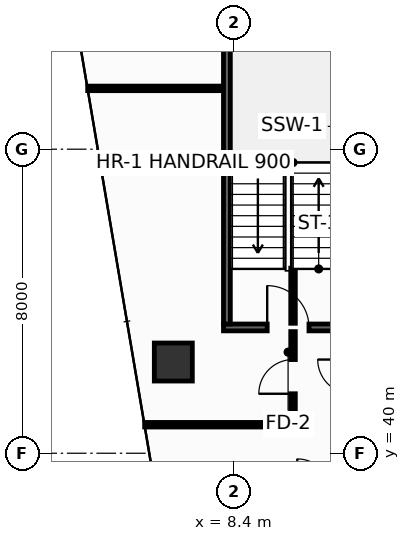
"""IFC4 building model, lengths in metres.
Left out: names, types, materials, properties, quantities, classifications, styles, units other than length and angle.
Written with IfcOpenShell. Run it as: python <this file> out.ifc"""

import sys

from ifc_helpers import new_model, si_unit, direction, frame, frame_2d, origin, origin_2d, place, context, subcontext, project, spatial, rectangle, hollow_rectangle, extrude, element, fill, save


model = new_model("IFC4")
c1 = context("Model", 3, precision=1e-05, world=origin(), true_north=direction((0.0, 1.0)))
c2 = subcontext(c1, "Body", "Model", "MODEL_VIEW")
j1 = project(units=[si_unit("LENGTHUNIT", "METRE"), si_unit("PLANEANGLEUNIT", "RADIAN")], contexts=[c1])
p1 = place(None, origin())
s1 = spatial("IfcSite", under=j1, at=p1, CompositionType="ELEMENT")
p2 = place(p1, origin())
s2 = spatial("IfcBuilding", under=s1, at=p2, CompositionType="ELEMENT")
p3 = place(p2, frame((0.0, 0.0, 175.2)))
s3 = spatial("IfcBuildingStorey", under=s2, at=p3, CompositionType="ELEMENT", Elevation=175.2)
p4 = place(p3, frame((6.8, 42.4, 0.0), z_axis=(0.0, 0.0, 1.0), x_axis=(1.0, 0.0, 0.0)))
e1 = element("IfcColumn", 1, at=p4, inside=s3, PredefinedType="COLUMN", context=c2, shape_type="SweptSolid", body=[
    extrude(hollow_rectangle(XDim=1.0, YDim=1.0, WallThickness=0.045, at=origin_2d()), origin(), (0.0, 0.0, 1.0), 3.8),
])
p5 = place(p3, frame((8.12, 43.31, 0.0), z_axis=(0.0, 0.0, 1.0), x_axis=(1.0, 0.0, 0.0)))
e2 = element("IfcWall", 2, at=p5, inside=s3, PredefinedType="SHEAR", context=c2, shape_type="SweptSolid", body=[
    extrude(rectangle(XDim=3.41, YDim=0.18, at=frame_2d((1.705, 0.0))), origin(), (0.0, 0.0, 1.0), 3.55),
])
p6 = place(p5, frame((1.15, 0.0, 0.0)))
e3 = element("IfcOpeningElement", 3, at=p6, cuts=e2, PredefinedType="OPENING", context=c2, shape_type="SweptSolid", body=[
    extrude(rectangle(XDim=1.1, YDim=2.15, at=frame_2d((0.55, 1.075))), frame((0.0, 0.1, 0.0), z_axis=(0.0, -1.0, 0.0), x_axis=(1.0, 0.0, 0.0)), (0.0, 0.0, 1.0), 0.2),
])
p7 = place(p3, frame((8.21, 53.8, 0.0), z_axis=(0.0, 0.0, 1.0), x_axis=(0.0, -1.0, 0.0)))
e4 = element("IfcWall", 4, at=p7, inside=s3, PredefinedType="SHEAR", context=c2, shape_type="SweptSolid", body=[
    extrude(rectangle(XDim=10.4, YDim=0.18, at=frame_2d((5.2, 0.0))), origin(), (0.0, 0.0, 1.0), 3.55),
])
p8 = place(p3, frame((6.045, 40.75, 0.0), z_axis=(0.0, 0.0, 1.0), x_axis=(1.0, 0.0, 0.0)))
e5 = element("IfcWall", 5, at=p8, inside=s3, PredefinedType="PARTITIONING", context=c2, shape_type="SweptSolid", body=[
    extrude(rectangle(XDim=3.905, YDim=0.12, at=frame_2d((1.952, 0.0))), origin(), (0.0, 0.0, 1.0), 3.035),
])
p9 = place(p3, frame((4.547, 49.6, 0.0), z_axis=(0.0, 0.0, 1.0), x_axis=(1.0, 0.0, 0.0)))
e6 = element("IfcWall", 6, at=p9, inside=s3, PredefinedType="PARTITIONING", context=c2, shape_type="SweptSolid", body=[
    extrude(rectangle(XDim=3.553, YDim=0.12, at=frame_2d((1.777, 0.0))), origin(), (0.0, 0.0, 1.0), 2.835),
])
p10 = place(p3, frame((9.95, 40.83, 0.0), z_axis=(0.0, 0.0, 1.0), x_axis=(0.0, 1.0, 0.0)))
e7 = element("IfcWall", 7, at=p10, inside=s3, PredefinedType="PARTITIONING", context=c2, shape_type="SweptSolid", body=[
    extrude(rectangle(XDim=2.37, YDim=0.12, at=frame_2d((1.185, 0.0))), origin(), (0.0, 0.0, 1.0), 2.835),
])
p11 = place(p10, frame((0.735, 0.0, 0.0)))
e8 = element("IfcOpeningElement", 8, at=p11, cuts=e7, PredefinedType="OPENING", context=c2, shape_type="SweptSolid", body=[
    extrude(rectangle(XDim=0.9, YDim=2.1, at=frame_2d((0.45, 1.05))), frame((0.0, 0.07, 0.0), z_axis=(0.0, -1.0, 0.0), x_axis=(1.0, 0.0, 0.0)), (0.0, 0.0, 1.0), 0.14),
])
p12 = place(p3, frame((9.95, 43.42, 0.0), z_axis=(0.0, 0.0, 1.0), x_axis=(0.0, 1.0, 0.0)))
e9 = element("IfcWall", 9, at=p12, inside=s3, PredefinedType="PARTITIONING", context=c2, shape_type="SweptSolid", body=[
    extrude(rectangle(XDim=1.45, YDim=0.12, at=frame_2d((0.725, 0.0))), origin(), (0.0, 0.0, 1.0), 3.55),
])
p13 = place(p6, origin())
e10 = element("IfcDoor", 10, at=p13, inside=s3, OperationType="SINGLE_SWING_LEFT", PredefinedType="DOOR", context=c2, shape_type="SweptSolid", body=[
    extrude(rectangle(XDim=1.1, YDim=2.15, at=frame_2d((0.55, 1.075))), frame((0.0, 0.025, 0.0), z_axis=(0.0, -1.0, 0.0), x_axis=(1.0, 0.0, 0.0)), (0.0, 0.0, 1.0), 0.05),
])
fill(e3, e10)
p14 = place(p11, origin())
e11 = element("IfcDoor", 11, at=p14, inside=s3, OperationType="SINGLE_SWING_LEFT", PredefinedType="DOOR", context=c2, shape_type="SweptSolid", body=[
    extrude(rectangle(XDim=0.9, YDim=2.1, at=frame_2d((0.45, 1.05))), frame((0.0, 0.025, 0.0), z_axis=(0.0, -1.0, 0.0), x_axis=(1.0, 0.0, 0.0)), (0.0, 0.0, 1.0), 0.05),
])
fill(e8, e11)
save(model, sys.argv[1])
